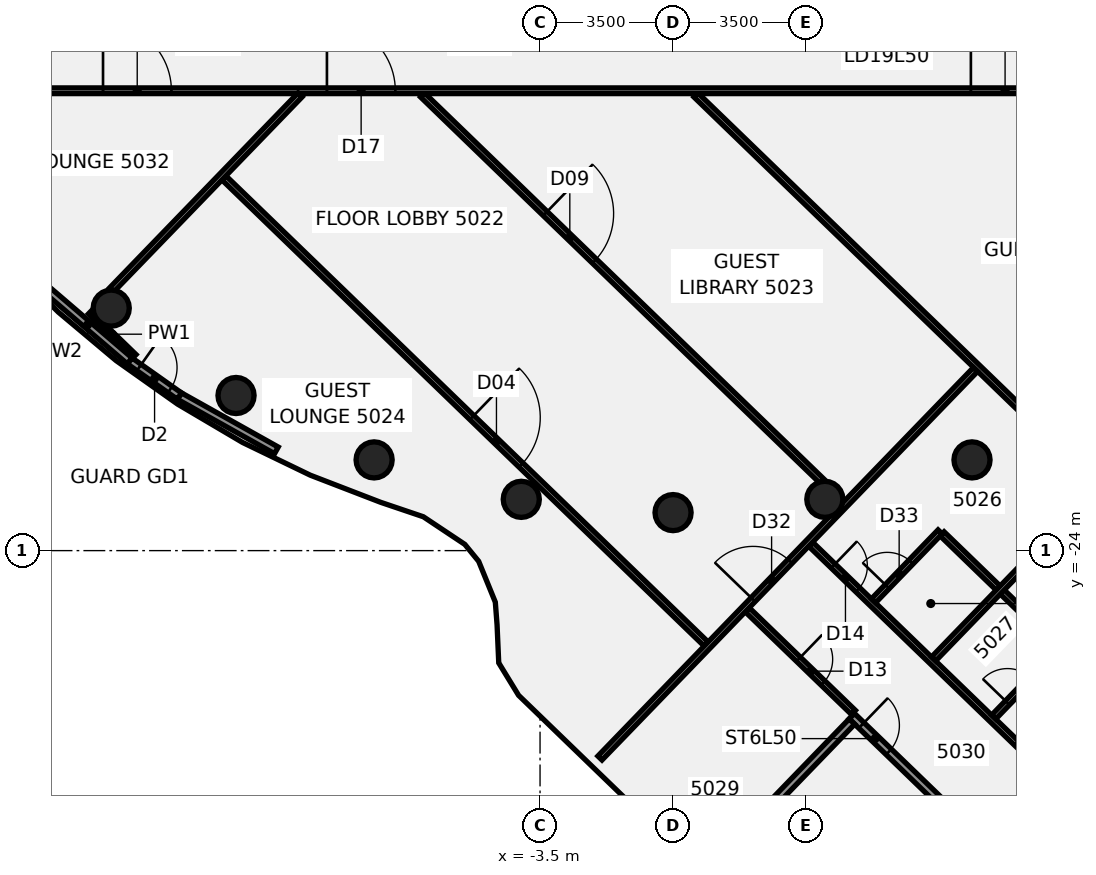
"""IFC4 building model, lengths in metres.
Left out: names, types, materials, properties, quantities, classifications, styles, units other than length and angle.
Written with IfcOpenShell. Run it as: python <this file> out.ifc"""

import sys

from ifc_helpers import new_model, si_unit, direction, frame, frame_2d, origin, origin_2d, place, context, subcontext, project, spatial, rectangle, circle, extrude, element, fill, save


model = new_model("IFC4")
c1 = context("Model", 3, precision=1e-05, world=origin(), true_north=direction((0.0, 1.0)))
c2 = subcontext(c1, "Body", "Model", "MODEL_VIEW")
j1 = project(units=[si_unit("LENGTHUNIT", "METRE"), si_unit("PLANEANGLEUNIT", "RADIAN")], contexts=[c1])
p1 = place(None, origin())
s1 = spatial("IfcSite", under=j1, at=p1, CompositionType="ELEMENT")
p2 = place(p1, origin())
s2 = spatial("IfcBuilding", under=s1, at=p2, CompositionType="ELEMENT")
p3 = place(p2, frame((0.0, 0.0, 200.5)))
s3 = spatial("IfcBuildingStorey", under=s2, at=p3, CompositionType="ELEMENT", Elevation=200.5)
for number, where, z_axis, x_axis in (
    (1, (-14.784, -17.619, -0.14), (0.0, 0.0, 1.0), (1.0, 0.0, 0.0)),
    (2, (-11.5, -19.919, -0.14), (0.0, 0.0, 1.0), (1.0, 0.0, 0.0)),
    (3, (-7.866, -21.613, -0.14), (0.0, 0.0, 1.0), (1.0, 0.0, 0.0)),
    (4, (-3.994, -22.651, -0.14), (0.0, 0.0, 1.0), (1.0, 0.0, 0.0)),
    (5, (0.0, -23.0, -0.14), (0.0, 0.0, 1.0), (1.0, 0.0, 0.0)),
    (6, (3.994, -22.651, -0.14), (0.0, 0.0, 1.0), (1.0, 0.0, 0.0)),
    (7, (7.866, -21.613, -0.14), (0.0, 0.0, 1.0), (1.0, 0.0, 0.0)),
):
    element("IfcColumn", number, at=place(p3, frame(where, z_axis=z_axis, x_axis=x_axis)), inside=s3, PredefinedType="COLUMN", context=c2, shape_type="SweptSolid", body=[
        extrude(circle(Radius=0.475, at=origin_2d()), origin(), (0.0, 0.0, 1.0), 3.6),
    ])
p4 = place(p3, frame((-15.348, -17.734, 0.0), z_axis=(0.0, 0.0, 1.0), x_axis=(0.718812747539, -0.695203735588, 0.0)))
e8 = element("IfcWall", 8, at=p4, inside=s3, PredefinedType="PARTITIONING", context=c2, shape_type="SweptSolid", body=[
    extrude(rectangle(XDim=1.644, YDim=0.1, at=frame_2d((0.822, 0.0))), origin(), (0.0, 0.0, 1.0), 2.864),
])
p5 = place(p3, frame((-11.815, -14.195, 0.0), z_axis=(0.0, 0.0, 1.0), x_axis=(0.718997828195, -0.695012318632, 0.0)))
e9 = element("IfcWall", 9, at=p5, inside=s3, PredefinedType="PARTITIONING", context=c2, shape_type="SweptSolid", body=[
    extrude(rectangle(XDim=17.64, YDim=0.15, at=frame_2d((8.82, 0.0))), origin(), (0.0, 0.0, 1.0), 2.864),
])
p6 = place(p5, frame((9.07, 0.0, 0.0)))
e10 = element("IfcOpeningElement", 10, at=p6, cuts=e9, PredefinedType="OPENING", context=c2, shape_type="SweptSolid", body=[
    extrude(rectangle(XDim=1.8, YDim=2.1, at=frame_2d((0.9, 1.05))), frame((0.0, 0.085, 0.0), z_axis=(0.0, -1.0, 0.0), x_axis=(1.0, 0.0, 0.0)), (0.0, 0.0, 1.0), 0.17),
])
p7 = place(p3, frame((-6.592, -12.011, 0.0), z_axis=(0.0, 0.0, 1.0), x_axis=(0.718966978759, -0.695044231293, 0.0)))
e11 = element("IfcWall", 11, at=p7, inside=s3, PredefinedType="PARTITIONING", context=c2, shape_type="SweptSolid", body=[
    extrude(rectangle(XDim=14.635, YDim=0.15, at=frame_2d((7.317, 0.0))), origin(), (0.0, 0.0, 1.0), 2.864),
])
p8 = place(p7, frame((4.49, 0.0, 0.0)))
e12 = element("IfcOpeningElement", 12, at=p8, cuts=e11, PredefinedType="OPENING", context=c2, shape_type="SweptSolid", body=[
    extrude(rectangle(XDim=1.8, YDim=2.1, at=frame_2d((0.9, 1.05))), frame((0.0, 0.085, 0.0), z_axis=(0.0, -1.0, 0.0), x_axis=(1.0, 0.0, 0.0)), (0.0, 0.0, 1.0), 0.17),
])
p9 = place(p3, frame((0.602, -12.011, 0.0), z_axis=(0.0, 0.0, 1.0), x_axis=(0.71894441759, -0.695067568238, 0.0)))
e13 = element("IfcWall", 13, at=p9, inside=s3, PredefinedType="PARTITIONING", context=c2, shape_type="SweptSolid", body=[
    extrude(rectangle(XDim=15.45, YDim=0.15, at=frame_2d((7.725, 0.0))), origin(), (0.0, 0.0, 1.0), 2.864),
])
p10 = place(p3, frame((1.956, -25.56, 0.0), z_axis=(0.0, 0.0, 1.0), x_axis=(0.71905335322, -0.694954872796, 0.0)))
e14 = element("IfcWall", 14, at=p10, inside=s3, PredefinedType="PARTITIONING", context=c2, shape_type="SweptSolid", body=[
    extrude(rectangle(XDim=3.88, YDim=0.15, at=frame_2d((1.94, 0.0))), origin(), (0.0, 0.0, 1.0), 2.864),
])
p11 = place(p10, frame((1.87, 0.0, 0.0)))
e15 = element("IfcOpeningElement", 15, at=p11, cuts=e14, PredefinedType="OPENING", context=c2, shape_type="SweptSolid", body=[
    extrude(rectangle(XDim=0.9, YDim=2.1, at=frame_2d((0.45, 1.05))), frame((0.0, 0.085, 0.0), z_axis=(0.0, -1.0, 0.0), x_axis=(1.0, 0.0, 0.0)), (0.0, 0.0, 1.0), 0.17),
])
p12 = place(p3, frame((3.624, -23.833, 0.0), z_axis=(0.0, 0.0, 1.0), x_axis=(0.719000873962, -0.69500916774, 0.0)))
e16 = element("IfcWall", 16, at=p12, inside=s3, PredefinedType="PARTITIONING", context=c2, shape_type="SweptSolid", body=[
    extrude(rectangle(XDim=13.341, YDim=0.15, at=frame_2d((6.67, 0.0))), origin(), (0.0, 0.0, 1.0), 2.864),
])
p13 = place(p12, frame((0.82, 0.0, 0.0)))
e17 = element("IfcOpeningElement", 17, at=p13, cuts=e16, PredefinedType="OPENING", context=c2, shape_type="SweptSolid", body=[
    extrude(rectangle(XDim=0.9, YDim=2.1, at=frame_2d((0.45, 1.05))), frame((0.0, 0.085, 0.0), z_axis=(0.0, -1.0, 0.0), x_axis=(1.0, 0.0, 0.0)), (0.0, 0.0, 1.0), 0.17),
])
p14 = place(p12, frame((7.52, 0.0, 0.0)))
e18 = element("IfcOpeningElement", 18, at=p14, cuts=e16, PredefinedType="OPENING", context=c2, shape_type="SweptSolid", body=[
    extrude(rectangle(XDim=0.9, YDim=2.1, at=frame_2d((0.45, 1.05))), frame((0.0, 0.085, 0.0), z_axis=(0.0, -1.0, 0.0), x_axis=(1.0, 0.0, 0.0)), (0.0, 0.0, 1.0), 0.17),
])
p15 = place(p12, frame((9.82, 0.0, 0.0)))
e19 = element("IfcOpeningElement", 19, at=p15, cuts=e16, PredefinedType="OPENING", context=c2, shape_type="SweptSolid", body=[
    extrude(rectangle(XDim=0.9, YDim=2.1, at=frame_2d((0.45, 1.05))), frame((0.0, 0.085, 0.0), z_axis=(0.0, -1.0, 0.0), x_axis=(1.0, 0.0, 0.0)), (0.0, 0.0, 1.0), 0.17),
])
p16 = place(p3, frame((7.081, -23.559, 0.0), z_axis=(0.0, 0.0, 1.0), x_axis=(0.718812302833, -0.695204195396, 0.0)))
e20 = element("IfcWall", 20, at=p16, inside=s3, PredefinedType="PARTITIONING", context=c2, shape_type="SweptSolid", body=[
    extrude(rectangle(XDim=4.25, YDim=0.15, at=frame_2d((2.125, 0.0))), origin(), (0.0, 0.0, 1.0), 2.864),
])
p17 = place(p3, frame((-17.1, -11.9, 0.0), z_axis=(0.0, 0.0, 1.0), x_axis=(1.0, 0.0, 0.0)))
e21 = element("IfcWall", 21, at=p17, inside=s3, PredefinedType="PARTITIONING", context=c2, shape_type="SweptSolid", body=[
    extrude(rectangle(XDim=34.165, YDim=0.15, at=frame_2d((17.083, 0.0))), origin(), (0.0, 0.0, 1.0), 2.864),
])
p18 = place(p17, frame((7.992, 0.0, 0.0)))
e22 = element("IfcOpeningElement", 22, at=p18, cuts=e21, PredefinedType="OPENING", context=c2, shape_type="SweptSolid", body=[
    extrude(rectangle(XDim=1.8, YDim=2.1, at=frame_2d((0.9, 1.05))), frame((0.0, 0.085, 0.0), z_axis=(0.0, -1.0, 0.0), x_axis=(1.0, 0.0, 0.0)), (0.0, 0.0, 1.0), 0.17),
])
p19 = place(p17, frame((2.1, 0.0, 0.0)))
e23 = element("IfcOpeningElement", 23, at=p19, cuts=e21, PredefinedType="OPENING", context=c2, shape_type="SweptSolid", body=[
    extrude(rectangle(XDim=1.8, YDim=2.1, at=frame_2d((0.9, 1.05))), frame((0.0, 0.085, 0.0), z_axis=(0.0, -1.0, 0.0), x_axis=(1.0, 0.0, 0.0)), (0.0, 0.0, 1.0), 0.17),
])
p20 = place(p17, frame((24.937, 0.0, 0.0)))
e24 = element("IfcOpeningElement", 24, at=p20, cuts=e21, PredefinedType="OPENING", context=c2, shape_type="SweptSolid", body=[
    extrude(rectangle(XDim=1.8, YDim=2.1, at=frame_2d((0.9, 1.05))), frame((0.0, 0.085, 0.0), z_axis=(0.0, -1.0, 0.0), x_axis=(1.0, 0.0, 0.0)), (0.0, 0.0, 1.0), 0.17),
])
p21 = place(p3, frame((-14.771, -17.137, 0.0), z_axis=(0.0, 0.0, 1.0), x_axis=(0.695029172264, 0.718981536412, 0.0)))
e25 = element("IfcWall", 25, at=p21, inside=s3, PredefinedType="PARTITIONING", context=c2, shape_type="SweptSolid", body=[
    extrude(rectangle(XDim=7.135, YDim=0.15, at=frame_2d((3.567, 0.0))), origin(), (0.0, 0.0, 1.0), 2.864),
])
p22 = place(p3, frame((-1.924, -29.458, 0.0), z_axis=(0.0, 0.0, 1.0), x_axis=(0.694993988342, 0.719015546542, 0.0)))
e26 = element("IfcWall", 26, at=p22, inside=s3, PredefinedType="PARTITIONING", context=c2, shape_type="SweptSolid", body=[
    extrude(rectangle(XDim=14.219, YDim=0.15, at=frame_2d((7.109, 0.0))), origin(), (0.0, 0.0, 1.0), 2.864),
])
p23 = place(p22, frame((5.799, 0.0, 0.0)))
e27 = element("IfcOpeningElement", 27, at=p23, cuts=e26, PredefinedType="OPENING", context=c2, shape_type="SweptSolid", body=[
    extrude(rectangle(XDim=1.4, YDim=2.1, at=frame_2d((0.7, 1.05))), frame((0.0, 0.085, 0.0), z_axis=(0.0, -1.0, 0.0), x_axis=(1.0, 0.0, 0.0)), (0.0, 0.0, 1.0), 0.17),
])
p24 = place(p3, frame((5.276, -25.32, 0.0), z_axis=(0.0, 0.0, 1.0), x_axis=(0.694895234989, 0.719110987532, 0.0)))
e28 = element("IfcWall", 28, at=p24, inside=s3, PredefinedType="PARTITIONING", context=c2, shape_type="SweptSolid", body=[
    extrude(rectangle(XDim=2.521, YDim=0.15, at=frame_2d((1.26, 0.0))), origin(), (0.0, 0.0, 1.0), 2.864),
])
p25 = place(p24, frame((0.52, 0.0, 0.0)))
e29 = element("IfcOpeningElement", 29, at=p25, cuts=e28, PredefinedType="OPENING", context=c2, shape_type="SweptSolid", body=[
    extrude(rectangle(XDim=0.9, YDim=2.1, at=frame_2d((0.45, 1.05))), frame((0.0, 0.085, 0.0), z_axis=(0.0, -1.0, 0.0), x_axis=(1.0, 0.0, 0.0)), (0.0, 0.0, 1.0), 0.17),
])
p26 = place(p3, frame((6.858, -26.848, 0.0), z_axis=(0.0, 0.0, 1.0), x_axis=(0.695100355809, 0.71891271748, 0.0)))
e30 = element("IfcWall", 30, at=p26, inside=s3, PredefinedType="PARTITIONING", context=c2, shape_type="SweptSolid", body=[
    extrude(rectangle(XDim=3.763, YDim=0.15, at=frame_2d((1.881, 0.0))), origin(), (0.0, 0.0, 1.0), 2.864),
])
p27 = place(p3, frame((8.439, -28.377, 0.0), z_axis=(0.0, 0.0, 1.0), x_axis=(0.695038793362, 0.71897223571, 0.0)))
e31 = element("IfcWall", 31, at=p27, inside=s3, PredefinedType="PARTITIONING", context=c2, shape_type="SweptSolid", body=[
    extrude(rectangle(XDim=2.52, YDim=0.15, at=frame_2d((1.26, 0.0))), origin(), (0.0, 0.0, 1.0), 2.864),
])
p28 = place(p27, frame((0.52, 0.0, 0.0)))
e32 = element("IfcOpeningElement", 32, at=p28, cuts=e31, PredefinedType="OPENING", context=c2, shape_type="SweptSolid", body=[
    extrude(rectangle(XDim=0.9, YDim=2.1, at=frame_2d((0.45, 1.05))), frame((0.0, 0.085, 0.0), z_axis=(0.0, -1.0, 0.0), x_axis=(1.0, 0.0, 0.0)), (0.0, 0.0, 1.0), 0.17),
])
p29 = place(p3, frame((-16.516, -17.106, 0.0), z_axis=(0.0, 0.0, 1.0), x_axis=(0.758985417635, -0.651107622301, 0.0)))
e33 = element("IfcWall", 33, at=p29, inside=s3, PredefinedType="SOLIDWALL", context=c2, shape_type="SweptSolid", body=[
    extrude(rectangle(XDim=2.924, YDim=0.2, at=frame_2d((1.462, 0.0))), origin(), (0.0, 0.0, 1.0), 3.46),
])
p30 = place(p3, frame((-12.99, -19.934, 0.0), z_axis=(0.0, 0.0, 1.0), x_axis=(0.872672529234, -0.488305904859, 0.0)))
e34 = element("IfcWall", 34, at=p30, inside=s3, PredefinedType="SOLIDWALL", context=c2, shape_type="SweptSolid", body=[
    extrude(rectangle(XDim=2.924, YDim=0.2, at=frame_2d((1.462, 0.0))), origin(), (0.0, 0.0, 1.0), 3.46),
])
p31 = place(p3, frame((-14.296, -19.01, 0.0), z_axis=(0.0, 0.0, 1.0), x_axis=(0.816303315767, -0.577623490405, 0.0)))
e35 = element("IfcWall", 35, at=p31, inside=s3, PredefinedType="SOLIDWALL", context=c2, shape_type="SweptSolid", body=[
    extrude(rectangle(XDim=1.6, YDim=0.2, at=frame_2d((0.8, 0.0))), origin(), (0.0, 0.0, 1.0), 3.46),
])
p32 = place(p31, frame((0.3, 0.0, 0.0)))
e36 = element("IfcOpeningElement", 36, at=p32, cuts=e35, PredefinedType="OPENING", context=c2, shape_type="SweptSolid", body=[
    extrude(rectangle(XDim=1.0, YDim=2.4, at=frame_2d((0.5, 1.2))), frame((0.0, 0.11, 0.0), z_axis=(0.0, -1.0, 0.0), x_axis=(1.0, 0.0, 0.0)), (0.0, 0.0, 1.0), 0.22),
])
p33 = place(p3, frame((4.705, -28.356, -0.14), z_axis=(0.0, 0.0, 1.0), x_axis=(0.718975629644, -0.695035282542, 0.0)))
e37 = element("IfcWall", 37, at=p33, inside=s3, PredefinedType="SHEAR", context=c2, shape_type="SweptSolid", body=[
    extrude(rectangle(XDim=6.7, YDim=0.2, at=frame_2d((3.35, 0.0))), origin(), (0.0, 0.0, 1.0), 3.004),
])
p34 = place(p33, frame((0.35, 0.0, 0.0)))
e38 = element("IfcOpeningElement", 38, at=p34, cuts=e37, PredefinedType="OPENING", context=c2, shape_type="SweptSolid", body=[
    extrude(rectangle(XDim=1.0, YDim=2.1, at=frame_2d((0.5, 1.05))), frame((0.0, 0.11, 0.0), z_axis=(0.0, -1.0, 0.0), x_axis=(1.0, 0.0, 0.0)), (0.0, 0.0, 1.0), 0.22),
])
p35 = place(p3, frame((2.483, -30.798, -0.14), z_axis=(0.0, 0.0, 1.0), x_axis=(0.695027355379, 0.718983292765, 0.0)))
e39 = element("IfcWall", 39, at=p35, inside=s3, PredefinedType="SHEAR", context=c2, shape_type="SweptSolid", body=[
    extrude(rectangle(XDim=3.2, YDim=0.2, at=frame_2d((1.6, 0.0))), origin(), (0.0, 0.0, 1.0), 3.004),
])
p36 = place(p6, frame((1.8, 0.0, 0.0), z_axis=(0.0, 0.0, 1.0), x_axis=(-1.0, 0.0, 0.0)))
e40 = element("IfcDoor", 40, at=p36, inside=s3, OperationType="DOUBLE_DOOR_SINGLE_SWING", PredefinedType="DOOR", context=c2, shape_type="SweptSolid", body=[
    extrude(rectangle(XDim=1.8, YDim=2.1, at=frame_2d((0.9, 1.05))), frame((0.0, 0.025, 0.0), z_axis=(0.0, -1.0, 0.0), x_axis=(1.0, 0.0, 0.0)), (0.0, 0.0, 1.0), 0.05),
])
fill(e10, e40)
p37 = place(p8, origin())
e41 = element("IfcDoor", 41, at=p37, inside=s3, OperationType="DOUBLE_DOOR_SINGLE_SWING", PredefinedType="DOOR", context=c2, shape_type="SweptSolid", body=[
    extrude(rectangle(XDim=1.8, YDim=2.1, at=frame_2d((0.9, 1.05))), frame((0.0, 0.025, 0.0), z_axis=(0.0, -1.0, 0.0), x_axis=(1.0, 0.0, 0.0)), (0.0, 0.0, 1.0), 0.05),
])
fill(e12, e41)
p38 = place(p11, frame((0.9, 0.0, 0.0), z_axis=(0.0, 0.0, 1.0), x_axis=(-1.0, 0.0, 0.0)))
e42 = element("IfcDoor", 42, at=p38, inside=s3, OperationType="SINGLE_SWING_RIGHT", PredefinedType="DOOR", context=c2, shape_type="SweptSolid", body=[
    extrude(rectangle(XDim=0.9, YDim=2.1, at=frame_2d((0.45, 1.05))), frame((0.0, 0.025, 0.0), z_axis=(0.0, -1.0, 0.0), x_axis=(1.0, 0.0, 0.0)), (0.0, 0.0, 1.0), 0.05),
])
fill(e15, e42)
p39 = place(p13, origin())
e43 = element("IfcDoor", 43, at=p39, inside=s3, OperationType="SINGLE_SWING_RIGHT", PredefinedType="DOOR", context=c2, shape_type="SweptSolid", body=[
    extrude(rectangle(XDim=0.9, YDim=2.1, at=frame_2d((0.45, 1.05))), frame((0.0, 0.025, 0.0), z_axis=(0.0, -1.0, 0.0), x_axis=(1.0, 0.0, 0.0)), (0.0, 0.0, 1.0), 0.05),
])
fill(e17, e43)
p40 = place(p14, origin())
e44 = element("IfcDoor", 44, at=p40, inside=s3, OperationType="SINGLE_SWING_LEFT", PredefinedType="DOOR", context=c2, shape_type="SweptSolid", body=[
    extrude(rectangle(XDim=0.9, YDim=2.1, at=frame_2d((0.45, 1.05))), frame((0.0, 0.025, 0.0), z_axis=(0.0, -1.0, 0.0), x_axis=(1.0, 0.0, 0.0)), (0.0, 0.0, 1.0), 0.05),
])
fill(e18, e44)
p41 = place(p18, origin())
e45 = element("IfcDoor", 45, at=p41, inside=s3, OperationType="DOUBLE_DOOR_SINGLE_SWING", PredefinedType="DOOR", context=c2, shape_type="SweptSolid", body=[
    extrude(rectangle(XDim=1.8, YDim=2.1, at=frame_2d((0.9, 1.05))), frame((0.0, 0.025, 0.0), z_axis=(0.0, -1.0, 0.0), x_axis=(1.0, 0.0, 0.0)), (0.0, 0.0, 1.0), 0.05),
])
fill(e22, e45)
p42 = place(p19, frame((1.8, 0.0, 0.0), z_axis=(0.0, 0.0, 1.0), x_axis=(-1.0, 0.0, 0.0)))
e46 = element("IfcDoor", 46, at=p42, inside=s3, OperationType="DOUBLE_DOOR_SINGLE_SWING", PredefinedType="DOOR", context=c2, shape_type="SweptSolid", body=[
    extrude(rectangle(XDim=1.8, YDim=2.1, at=frame_2d((0.9, 1.05))), frame((0.0, 0.025, 0.0), z_axis=(0.0, -1.0, 0.0), x_axis=(1.0, 0.0, 0.0)), (0.0, 0.0, 1.0), 0.05),
])
fill(e23, e46)
p43 = place(p20, frame((1.8, 0.0, 0.0), z_axis=(0.0, 0.0, 1.0), x_axis=(-1.0, 0.0, 0.0)))
e47 = element("IfcDoor", 47, at=p43, inside=s3, OperationType="DOUBLE_DOOR_SINGLE_SWING", PredefinedType="DOOR", context=c2, shape_type="SweptSolid", body=[
    extrude(rectangle(XDim=1.8, YDim=2.1, at=frame_2d((0.9, 1.05))), frame((0.0, 0.025, 0.0), z_axis=(0.0, -1.0, 0.0), x_axis=(1.0, 0.0, 0.0)), (0.0, 0.0, 1.0), 0.05),
])
fill(e24, e47)
p44 = place(p23, origin())
e48 = element("IfcDoor", 48, at=p44, inside=s3, OperationType="DOUBLE_DOOR_SINGLE_SWING", PredefinedType="DOOR", context=c2, shape_type="SweptSolid", body=[
    extrude(rectangle(XDim=1.4, YDim=2.1, at=frame_2d((0.7, 1.05))), frame((0.0, 0.025, 0.0), z_axis=(0.0, -1.0, 0.0), x_axis=(1.0, 0.0, 0.0)), (0.0, 0.0, 1.0), 0.05),
])
fill(e27, e48)
p45 = place(p25, frame((0.9, 0.0, 0.0), z_axis=(0.0, 0.0, 1.0), x_axis=(-1.0, 0.0, 0.0)))
e49 = element("IfcDoor", 49, at=p45, inside=s3, OperationType="SINGLE_SWING_LEFT", PredefinedType="DOOR", context=c2, shape_type="SweptSolid", body=[
    extrude(rectangle(XDim=0.9, YDim=2.1, at=frame_2d((0.45, 1.05))), frame((0.0, 0.025, 0.0), z_axis=(0.0, -1.0, 0.0), x_axis=(1.0, 0.0, 0.0)), (0.0, 0.0, 1.0), 0.05),
])
fill(e29, e49)
p46 = place(p28, origin())
e50 = element("IfcDoor", 50, at=p46, inside=s3, OperationType="SINGLE_SWING_RIGHT", PredefinedType="DOOR", context=c2, shape_type="SweptSolid", body=[
    extrude(rectangle(XDim=0.9, YDim=2.1, at=frame_2d((0.45, 1.05))), frame((0.0, 0.025, 0.0), z_axis=(0.0, -1.0, 0.0), x_axis=(1.0, 0.0, 0.0)), (0.0, 0.0, 1.0), 0.05),
])
fill(e32, e50)
p47 = place(p32, origin())
e51 = element("IfcDoor", 51, at=p47, inside=s3, OperationType="SINGLE_SWING_LEFT", PredefinedType="DOOR", context=c2, shape_type="SweptSolid", body=[
    extrude(rectangle(XDim=1.0, YDim=2.4, at=frame_2d((0.5, 1.2))), frame((0.0, 0.025, 0.0), z_axis=(0.0, -1.0, 0.0), x_axis=(1.0, 0.0, 0.0)), (0.0, 0.0, 1.0), 0.05),
])
fill(e36, e51)
p48 = place(p34, origin())
e52 = element("IfcDoor", 52, at=p48, inside=s3, OperationType="SINGLE_SWING_LEFT", PredefinedType="DOOR", context=c2, shape_type="SweptSolid", body=[
    extrude(rectangle(XDim=1.0, YDim=2.1, at=frame_2d((0.5, 1.05))), frame((0.0, 0.025, 0.0), z_axis=(0.0, -1.0, 0.0), x_axis=(1.0, 0.0, 0.0)), (0.0, 0.0, 1.0), 0.05),
])
fill(e38, e52)
save(model, sys.argv[1])
